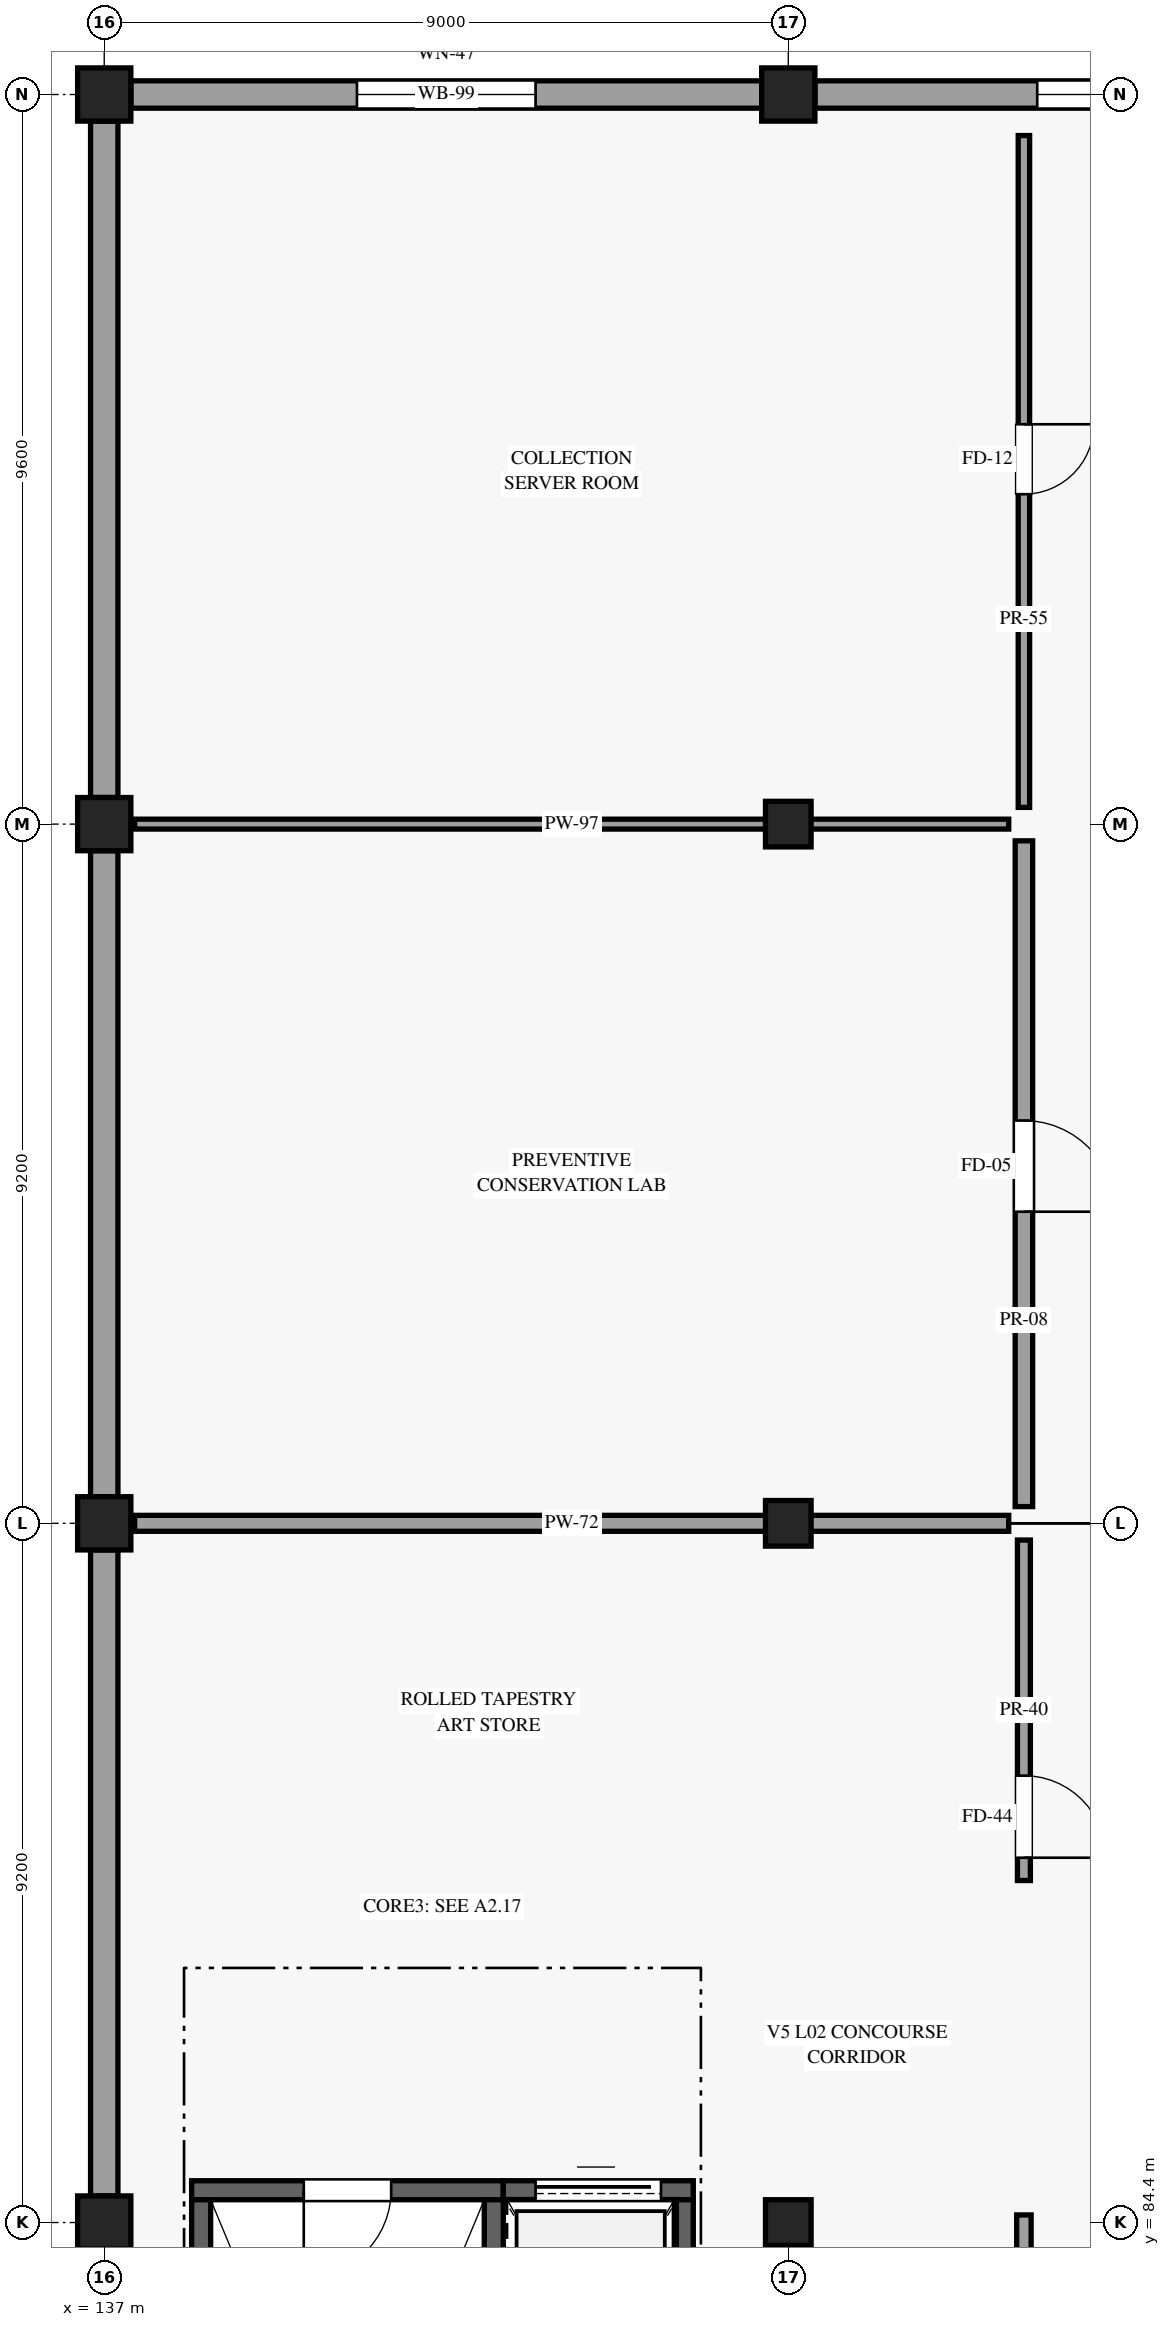
"""IFC4 building model, lengths in metres.
Left out: names, types, materials, properties, quantities, classifications, styles, units other than length and angle.
Written with IfcOpenShell. Run it as: python <this file> out.ifc"""

import sys

from ifc_helpers import new_model, si_unit, direction, frame, frame_2d, origin, origin_2d, place, context, subcontext, project, spatial, rectangle, extrude, element, fill, save


model = new_model("IFC4")
c1 = context("Model", 3, precision=1e-05, world=origin(), true_north=direction((0.0, 1.0)))
c2 = subcontext(c1, "Body", "Model", "MODEL_VIEW")
j1 = project(units=[si_unit("LENGTHUNIT", "METRE"), si_unit("PLANEANGLEUNIT", "RADIAN")], contexts=[c1])
p1 = place(None, origin())
s1 = spatial("IfcSite", under=j1, at=p1, CompositionType="ELEMENT")
p2 = place(p1, origin())
s2 = spatial("IfcBuilding", under=s1, at=p2, CompositionType="ELEMENT")
p3 = place(p2, frame((0.0, 0.0, 10.2)))
s3 = spatial("IfcBuildingStorey", under=s2, at=p3, CompositionType="ELEMENT", Elevation=10.2)
for number, where, z_axis, x_axis in (
    (1, (137.0, 84.4, 0.0), (0.0, 0.0, 1.0), (1.0, 0.0, 0.0)),
    (2, (137.0, 93.6, 0.0), (0.0, 0.0, 1.0), (1.0, 0.0, 0.0)),
    (3, (137.0, 102.8, 0.0), (0.0, 0.0, 1.0), (1.0, 0.0, 0.0)),
    (4, (137.0, 112.4, 0.0), (0.0, 0.0, 1.0), (1.0, 0.0, 0.0)),
):
    element("IfcColumn", number, at=place(p3, frame(where, z_axis=z_axis, x_axis=x_axis)), inside=s3, PredefinedType="COLUMN", context=c2, shape_type="SweptSolid", body=[
        extrude(rectangle(XDim=0.7, YDim=0.7, at=origin_2d()), origin(), (0.0, 0.0, 1.0), 4.8),
    ])
for number, where, z_axis, x_axis in (
    (5, (146.0, 84.4, 0.0), (0.0, 0.0, 1.0), (1.0, 0.0, 0.0)),
    (6, (146.0, 93.6, 0.0), (0.0, 0.0, 1.0), (1.0, 0.0, 0.0)),
    (7, (146.0, 102.8, 0.0), (0.0, 0.0, 1.0), (1.0, 0.0, 0.0)),
):
    element("IfcColumn", number, at=place(p3, frame(where, z_axis=z_axis, x_axis=x_axis)), inside=s3, PredefinedType="COLUMN", context=c2, shape_type="SweptSolid", body=[
        extrude(rectangle(XDim=0.6, YDim=0.6, at=origin_2d()), origin(), (0.0, 0.0, 1.0), 4.8),
    ])
p4 = place(p3, frame((146.0, 112.4, 0.0), z_axis=(0.0, 0.0, 1.0), x_axis=(1.0, 0.0, 0.0)))
e8 = element("IfcColumn", 8, at=p4, inside=s3, PredefinedType="COLUMN", context=c2, shape_type="SweptSolid", body=[
    extrude(rectangle(XDim=0.7, YDim=0.7, at=origin_2d()), origin(), (0.0, 0.0, 1.0), 4.8),
])
p5 = place(p3, frame((137.35, 112.4, 0.0), z_axis=(0.0, 0.0, 1.0), x_axis=(1.0, 0.0, 0.0)))
e9 = element("IfcWall", 9, at=p5, inside=s3, PredefinedType="STANDARD", context=c2, shape_type="SweptSolid", body=[
    extrude(rectangle(XDim=8.3, YDim=0.36, at=frame_2d((4.15, 0.0))), origin(), (0.0, 0.0, 1.0), 3.715),
])
p6 = place(p5, frame((2.975, 0.0, 0.85)))
e10 = element("IfcOpeningElement", 10, at=p6, cuts=e9, PredefinedType="OPENING", context=c2, shape_type="SweptSolid", body=[
    extrude(rectangle(XDim=2.35, YDim=2.35, at=frame_2d((1.175, 1.175))), frame((0.0, 0.19, 0.0), z_axis=(0.0, -1.0, 0.0), x_axis=(1.0, 0.0, 0.0)), (0.0, 0.0, 1.0), 0.38),
])
p7 = place(p3, frame((146.35, 112.4, 0.0), z_axis=(0.0, 0.0, 1.0), x_axis=(1.0, 0.0, 0.0)))
e11 = element("IfcWall", 11, at=p7, inside=s3, PredefinedType="STANDARD", context=c2, shape_type="SweptSolid", body=[
    extrude(rectangle(XDim=8.3, YDim=0.36, at=frame_2d((4.15, 0.0))), origin(), (0.0, 0.0, 1.0), 3.715),
])
p8 = place(p7, frame((2.925, 0.0, 0.85)))
e12 = element("IfcOpeningElement", 12, at=p8, cuts=e11, PredefinedType="OPENING", context=c2, shape_type="SweptSolid", body=[
    extrude(rectangle(XDim=2.45, YDim=2.4, at=frame_2d((1.225, 1.2))), frame((0.0, 0.19, 0.0), z_axis=(0.0, -1.0, 0.0), x_axis=(1.0, 0.0, 0.0)), (0.0, 0.0, 1.0), 0.38),
])
for number, where, z_axis, x_axis in (
    (13, (137.0, 84.75, 0.0), (0.0, 0.0, 1.0), (0.0, 1.0, 0.0)),
    (14, (137.0, 93.95, 0.0), (0.0, 0.0, 1.0), (0.0, 1.0, 0.0)),
):
    element("IfcWall", number, at=place(p3, frame(where, z_axis=z_axis, x_axis=x_axis)), inside=s3, PredefinedType="STANDARD", context=c2, shape_type="SweptSolid", body=[
        extrude(rectangle(XDim=8.5, YDim=0.36, at=frame_2d((4.25, 0.0))), origin(), (0.0, 0.0, 1.0), 3.715),
    ])
p9 = place(p3, frame((137.0, 103.15, 0.0), z_axis=(0.0, 0.0, 1.0), x_axis=(0.0, 1.0, 0.0)))
e15 = element("IfcWall", 15, at=p9, inside=s3, PredefinedType="STANDARD", context=c2, shape_type="SweptSolid", body=[
    extrude(rectangle(XDim=8.9, YDim=0.36, at=frame_2d((4.45, 0.0))), origin(), (0.0, 0.0, 1.0), 3.715),
])
p10 = place(p3, frame((138.15, 84.825, 0.0), z_axis=(0.0, 0.0, 1.0), x_axis=(1.0, 0.0, 0.0)))
e16 = element("IfcWall", 16, at=p10, inside=s3, PredefinedType="SHEAR", context=c2, shape_type="SweptSolid", body=[
    extrude(rectangle(XDim=4.1, YDim=0.25, at=frame_2d((2.05, 0.0))), origin(), (0.0, 0.0, 1.0), 4.52),
])
p11 = place(p10, frame((2.625, 0.0, 0.0), z_axis=(0.0, 0.0, 1.0), x_axis=(-1.0, 0.0, 0.0)))
e17 = element("IfcOpeningElement", 17, at=p11, cuts=e16, PredefinedType="OPENING", context=c2, shape_type="SweptSolid", body=[
    extrude(rectangle(XDim=1.15, YDim=2.2, at=frame_2d((0.575, 1.1))), frame((0.0, 0.135, 0.0), z_axis=(0.0, -1.0, 0.0), x_axis=(1.0, 0.0, 0.0)), (0.0, 0.0, 1.0), 0.27),
])
for number, where, z_axis, x_axis in (
    (18, (138.275, 76.05, 0.0), (0.0, 0.0, 1.0), (0.0, 1.0, 0.0)),
    (19, (142.125, 76.05, 0.0), (0.0, 0.0, 1.0), (0.0, 1.0, 0.0)),
):
    element("IfcWall", number, at=place(p3, frame(where, z_axis=z_axis, x_axis=x_axis)), inside=s3, PredefinedType="SHEAR", context=c2, shape_type="SweptSolid", body=[
        extrude(rectangle(XDim=8.65, YDim=0.25, at=frame_2d((4.325, 0.0))), origin(), (0.0, 0.0, 1.0), 4.52),
    ])
p12 = place(p3, frame((142.25, 84.825, 0.0), z_axis=(0.0, 0.0, 1.0), x_axis=(1.0, 0.0, 0.0)))
e20 = element("IfcWall", 20, at=p12, inside=s3, PredefinedType="SHEAR", context=c2, shape_type="SweptSolid", body=[
    extrude(rectangle(XDim=2.5, YDim=0.25, at=frame_2d((1.25, 0.0))), origin(), (0.0, 0.0, 1.0), 4.52),
])
p13 = place(p12, frame((0.425, 0.0, 0.0)))
e21 = element("IfcOpeningElement", 21, at=p13, cuts=e20, PredefinedType="OPENING", context=c2, shape_type="SweptSolid", body=[
    extrude(rectangle(XDim=1.65, YDim=2.45, at=frame_2d((0.825, 1.225))), frame((0.0, 0.135, 0.0), z_axis=(0.0, -1.0, 0.0), x_axis=(1.0, 0.0, 0.0)), (0.0, 0.0, 1.0), 0.27),
])
p14 = place(p3, frame((144.625, 80.9, 0.0), z_axis=(0.0, 0.0, 1.0), x_axis=(0.0, 1.0, 0.0)))
e22 = element("IfcWall", 22, at=p14, inside=s3, PredefinedType="SHEAR", context=c2, shape_type="SweptSolid", body=[
    extrude(rectangle(XDim=3.8, YDim=0.25, at=frame_2d((1.9, 0.0))), origin(), (0.0, 0.0, 1.0), 4.52),
])
p15 = place(p3, frame((149.1, 88.9, 0.0), z_axis=(0.0, 0.0, 1.0), x_axis=(0.0, 1.0, 0.0)))
e23 = element("IfcWall", 23, at=p15, inside=s3, PredefinedType="PARTITIONING", context=c2, shape_type="SweptSolid", body=[
    extrude(rectangle(XDim=4.48, YDim=0.17, at=frame_2d((2.24, 0.0))), origin(), (0.0, 0.0, 1.0), 3.715),
])
p16 = place(p15, frame((1.38, 0.0, 0.0), z_axis=(0.0, 0.0, 1.0), x_axis=(-1.0, 0.0, 0.0)))
e24 = element("IfcOpeningElement", 24, at=p16, cuts=e23, PredefinedType="OPENING", context=c2, shape_type="SweptSolid", body=[
    extrude(rectangle(XDim=1.08, YDim=2.24, at=frame_2d((0.54, 1.12))), frame((0.0, 0.095, 0.0), z_axis=(0.0, -1.0, 0.0), x_axis=(1.0, 0.0, 0.0)), (0.0, 0.0, 1.0), 0.19),
])
p17 = place(p3, frame((149.1, 75.42, 0.0), z_axis=(0.0, 0.0, 1.0), x_axis=(0.0, 1.0, 0.0)))
e25 = element("IfcWall", 25, at=p17, inside=s3, PredefinedType="PARTITIONING", context=c2, shape_type="SweptSolid", body=[
    extrude(rectangle(XDim=9.08, YDim=0.19, at=frame_2d((4.54, 0.0))), origin(), (0.0, 0.0, 1.0), 3.715),
])
p18 = place(p17, frame((5.059, 0.0, 0.0), z_axis=(0.0, 0.0, 1.0), x_axis=(-1.0, 0.0, 0.0)))
e26 = element("IfcOpeningElement", 26, at=p18, cuts=e25, PredefinedType="OPENING", context=c2, shape_type="SweptSolid", body=[
    extrude(rectangle(XDim=1.12, YDim=2.26, at=frame_2d((0.56, 1.13))), frame((0.0, 0.105, 0.0), z_axis=(0.0, -1.0, 0.0), x_axis=(1.0, 0.0, 0.0)), (0.0, 0.0, 1.0), 0.21),
])
p19 = place(p3, frame((137.4, 93.6, 0.0), z_axis=(0.0, 0.0, 1.0), x_axis=(1.0, 0.0, 0.0)))
e27 = element("IfcWall", 27, at=p19, inside=s3, PredefinedType="PARTITIONING", context=c2, shape_type="SweptSolid", body=[
    extrude(rectangle(XDim=11.5, YDim=0.21, at=frame_2d((5.75, 0.0))), origin(), (0.0, 0.0, 1.0), 3.715),
])
p20 = place(p3, frame((149.1, 93.82, 0.0), z_axis=(0.0, 0.0, 1.0), x_axis=(0.0, 1.0, 0.0)))
e28 = element("IfcWall", 28, at=p20, inside=s3, PredefinedType="PARTITIONING", context=c2, shape_type="SweptSolid", body=[
    extrude(rectangle(XDim=8.76, YDim=0.23, at=frame_2d((4.38, 0.0))), origin(), (0.0, 0.0, 1.0), 3.715),
])
p21 = place(p20, frame((5.08, 0.0, 0.0), z_axis=(0.0, 0.0, 1.0), x_axis=(-1.0, 0.0, 0.0)))
e29 = element("IfcOpeningElement", 29, at=p21, cuts=e28, PredefinedType="OPENING", context=c2, shape_type="SweptSolid", body=[
    extrude(rectangle(XDim=1.2, YDim=2.3, at=frame_2d((0.6, 1.15))), frame((0.0, 0.125, 0.0), z_axis=(0.0, -1.0, 0.0), x_axis=(1.0, 0.0, 0.0)), (0.0, 0.0, 1.0), 0.25),
])
p22 = place(p3, frame((137.4, 102.8, 0.0), z_axis=(0.0, 0.0, 1.0), x_axis=(1.0, 0.0, 0.0)))
e30 = element("IfcWall", 30, at=p22, inside=s3, PredefinedType="PARTITIONING", context=c2, shape_type="SweptSolid", body=[
    extrude(rectangle(XDim=11.5, YDim=0.13, at=frame_2d((5.75, 0.0))), origin(), (0.0, 0.0, 1.0), 3.715),
])
p23 = place(p3, frame((149.1, 103.02, 0.0), z_axis=(0.0, 0.0, 1.0), x_axis=(0.0, 1.0, 0.0)))
e31 = element("IfcWall", 31, at=p23, inside=s3, PredefinedType="PARTITIONING", context=c2, shape_type="SweptSolid", body=[
    extrude(rectangle(XDim=8.84, YDim=0.15, at=frame_2d((4.42, 0.0))), origin(), (0.0, 0.0, 1.0), 3.715),
])
p24 = place(p23, frame((5.041, 0.0, 0.0), z_axis=(0.0, 0.0, 1.0), x_axis=(-1.0, 0.0, 0.0)))
e32 = element("IfcOpeningElement", 32, at=p24, cuts=e31, PredefinedType="OPENING", context=c2, shape_type="SweptSolid", body=[
    extrude(rectangle(XDim=0.92, YDim=2.12, at=frame_2d((0.46, 1.06))), frame((0.0, 0.085, 0.0), z_axis=(0.0, -1.0, 0.0), x_axis=(1.0, 0.0, 0.0)), (0.0, 0.0, 1.0), 0.17),
])
p25 = place(p6, origin())
e33 = element("IfcWindow", 33, at=p25, inside=s3, PartitioningType="SINGLE_PANEL", PredefinedType="WINDOW", context=c2, shape_type="SweptSolid", body=[
    extrude(rectangle(XDim=2.35, YDim=2.35, at=frame_2d((1.175, 1.175))), frame((0.0, 0.03, 0.0), z_axis=(0.0, -1.0, 0.0), x_axis=(1.0, 0.0, 0.0)), (0.0, 0.0, 1.0), 0.06),
])
fill(e10, e33)
p26 = place(p8, origin())
e34 = element("IfcWindow", 34, at=p26, inside=s3, PartitioningType="SINGLE_PANEL", PredefinedType="WINDOW", context=c2, shape_type="SweptSolid", body=[
    extrude(rectangle(XDim=2.45, YDim=2.4, at=frame_2d((1.225, 1.2))), frame((0.0, 0.03, 0.0), z_axis=(0.0, -1.0, 0.0), x_axis=(1.0, 0.0, 0.0)), (0.0, 0.0, 1.0), 0.06),
])
fill(e12, e34)
p27 = place(p11, origin())
e35 = element("IfcDoor", 35, at=p27, inside=s3, OperationType="SINGLE_SWING_RIGHT", PredefinedType="DOOR", context=c2, shape_type="SweptSolid", body=[
    extrude(rectangle(XDim=1.15, YDim=2.2, at=frame_2d((0.575, 1.1))), frame((0.0, 0.025, 0.0), z_axis=(0.0, -1.0, 0.0), x_axis=(1.0, 0.0, 0.0)), (0.0, 0.0, 1.0), 0.05),
])
fill(e17, e35)
p28 = place(p13, origin())
e36 = element("IfcDoor", 36, at=p28, inside=s3, OperationType="SLIDING_TO_LEFT", PredefinedType="DOOR", context=c2, shape_type="SweptSolid", body=[
    extrude(rectangle(XDim=1.65, YDim=2.45, at=frame_2d((0.825, 1.225))), frame((0.0, 0.025, 0.0), z_axis=(0.0, -1.0, 0.0), x_axis=(1.0, 0.0, 0.0)), (0.0, 0.0, 1.0), 0.05),
])
fill(e21, e36)
p29 = place(p16, origin())
e37 = element("IfcDoor", 37, at=p29, inside=s3, OperationType="SINGLE_SWING_RIGHT", PredefinedType="DOOR", context=c2, shape_type="SweptSolid", body=[
    extrude(rectangle(XDim=1.08, YDim=2.24, at=frame_2d((0.54, 1.12))), frame((0.0, 0.025, 0.0), z_axis=(0.0, -1.0, 0.0), x_axis=(1.0, 0.0, 0.0)), (0.0, 0.0, 1.0), 0.05),
])
fill(e24, e37)
p30 = place(p21, origin())
e38 = element("IfcDoor", 38, at=p30, inside=s3, OperationType="SINGLE_SWING_RIGHT", PredefinedType="DOOR", context=c2, shape_type="SweptSolid", body=[
    extrude(rectangle(XDim=1.2, YDim=2.3, at=frame_2d((0.6, 1.15))), frame((0.0, 0.025, 0.0), z_axis=(0.0, -1.0, 0.0), x_axis=(1.0, 0.0, 0.0)), (0.0, 0.0, 1.0), 0.05),
])
fill(e29, e38)
p31 = place(p24, origin())
e39 = element("IfcDoor", 39, at=p31, inside=s3, OperationType="SINGLE_SWING_LEFT", PredefinedType="DOOR", context=c2, shape_type="SweptSolid", body=[
    extrude(rectangle(XDim=0.92, YDim=2.12, at=frame_2d((0.46, 1.06))), frame((0.0, 0.025, 0.0), z_axis=(0.0, -1.0, 0.0), x_axis=(1.0, 0.0, 0.0)), (0.0, 0.0, 1.0), 0.05),
])
fill(e32, e39)
save(model, sys.argv[1])
